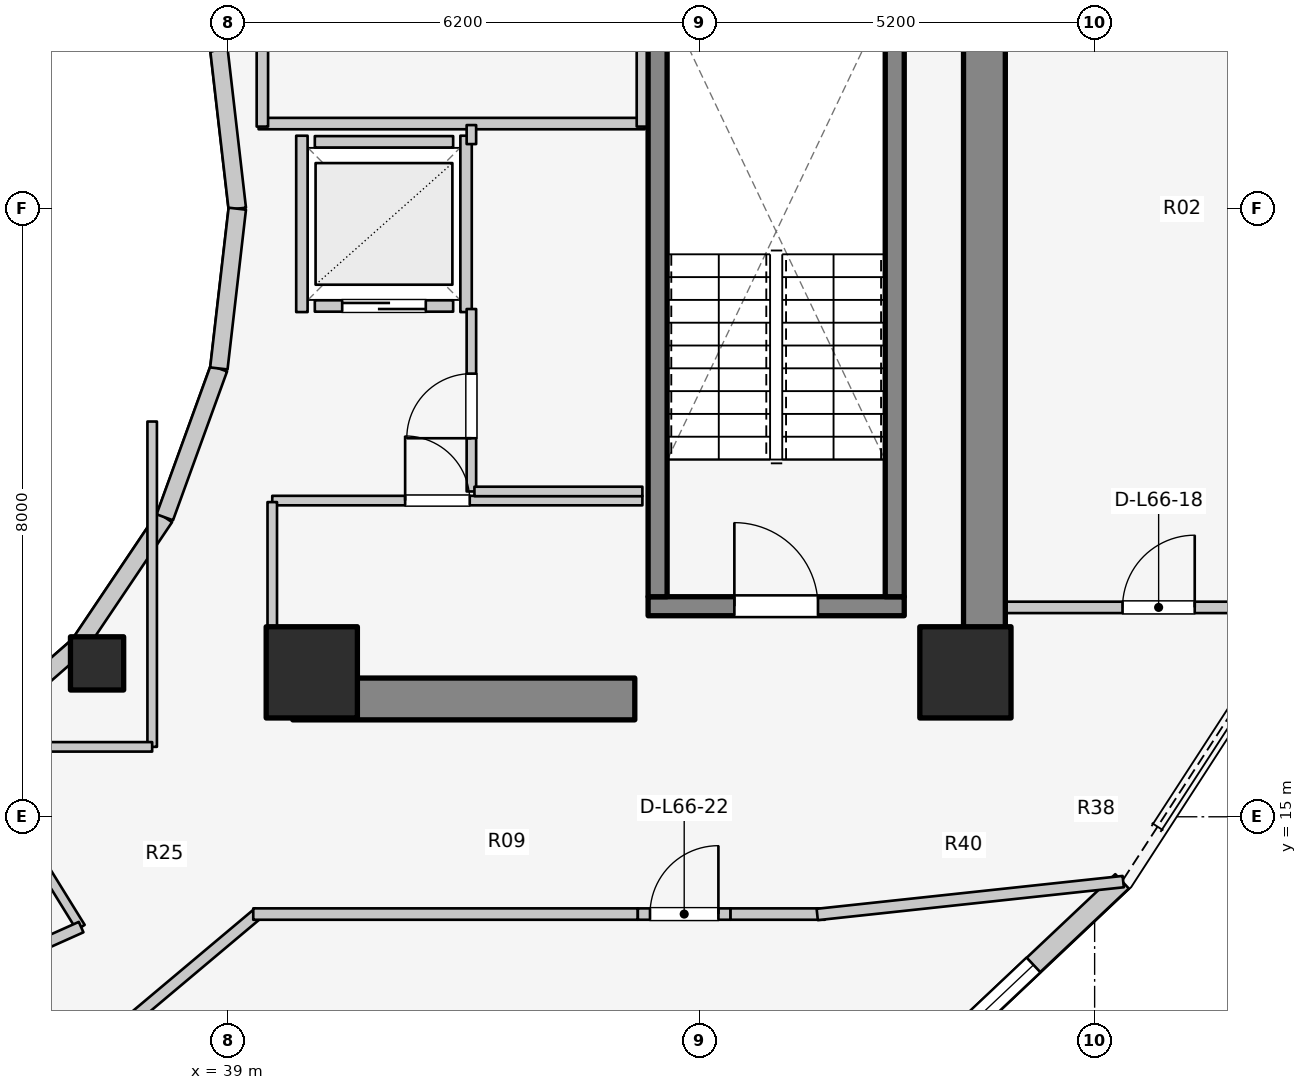
"""IFC4 building model, lengths in metres.
Left out: names, types, materials, properties, quantities, classifications, styles, units other than length and angle.
Written with IfcOpenShell. Run it as: python <this file> out.ifc"""

import sys

from ifc_helpers import new_model, si_unit, direction, frame, frame_2d, origin, origin_2d, place, context, subcontext, project, spatial, rectangle, extrude, element, fill, save


model = new_model("IFC4")
c1 = context("Model", 3, precision=1e-05, world=origin(), true_north=direction((0.0, 1.0)))
c2 = subcontext(c1, "Body", "Model", "MODEL_VIEW")
j1 = project(units=[si_unit("LENGTHUNIT", "METRE"), si_unit("PLANEANGLEUNIT", "RADIAN")], contexts=[c1])
p1 = place(None, origin())
s1 = spatial("IfcSite", under=j1, at=p1, CompositionType="ELEMENT")
p2 = place(p1, origin())
s2 = spatial("IfcBuilding", under=s1, at=p2, CompositionType="ELEMENT")
p3 = place(p2, frame((0.0, 0.0, 217.1)))
s3 = spatial("IfcBuildingStorey", under=s2, at=p3, CompositionType="ELEMENT", Elevation=217.1)
p4 = place(p3, frame((48.95, 17.05, 0.0), z_axis=(0.0, 0.0, 1.0), x_axis=(0.0, 1.0, 0.0)))
e1 = element("IfcWall", 1, at=p4, inside=s3, PredefinedType="SHEAR", context=c2, shape_type="SweptSolid", body=[
    extrude(rectangle(XDim=12.8, YDim=0.55, at=frame_2d((6.4, 0.0))), origin(), (0.0, 0.0, 1.0), 3.1),
])
p5 = place(p3, frame((39.85, 16.55, 0.0), z_axis=(0.0, 0.0, 1.0), x_axis=(1.0, 0.0, 0.0)))
e2 = element("IfcWall", 2, at=p5, inside=s3, PredefinedType="SHEAR", context=c2, shape_type="SweptSolid", body=[
    extrude(rectangle(XDim=4.5, YDim=0.55, at=frame_2d((2.25, 0.0))), origin(), (0.0, 0.0, 1.0), 3.1),
])
p6 = place(p3, frame((44.525, 17.77, 0.0), z_axis=(0.0, 0.0, 1.0), x_axis=(1.0, 0.0, 0.0)))
e3 = element("IfcWall", 3, at=p6, inside=s3, PredefinedType="SOLIDWALL", context=c2, shape_type="SweptSolid", body=[
    extrude(rectangle(XDim=3.37, YDim=0.25, at=frame_2d((1.685, 0.0))), origin(), (0.0, 0.0, 1.0), 3.1),
])
p7 = place(p6, frame((1.135, 0.0, 0.0)))
e4 = element("IfcOpeningElement", 4, at=p7, cuts=e3, PredefinedType="OPENING", context=c2, shape_type="SweptSolid", body=[
    extrude(rectangle(XDim=1.1, YDim=2.1, at=frame_2d((0.55, 1.05))), frame((0.0, 0.135, 0.0), z_axis=(0.0, -1.0, 0.0), x_axis=(1.0, 0.0, 0.0)), (0.0, 0.0, 1.0), 0.27),
])
for number, where, z_axis, x_axis in (
    (5, (44.65, 17.895, 0.0), (0.0, 0.0, 1.0), (0.0, 1.0, 0.0)),
    (6, (47.77, 17.895, 0.0), (0.0, 0.0, 1.0), (0.0, 1.0, 0.0)),
):
    element("IfcWall", number, at=place(p3, frame(where, z_axis=z_axis, x_axis=x_axis)), inside=s3, PredefinedType="SOLIDWALL", context=c2, shape_type="SweptSolid", body=[
        extrude(rectangle(XDim=7.81, YDim=0.25, at=frame_2d((3.905, 0.0))), origin(), (0.0, 0.0, 1.0), 3.1),
    ])
for number, where, z_axis, x_axis in (
    (7, (40.1, 16.9, 0.0), (0.0, 0.0, 1.0), (1.0, 0.0, 0.0)),
    (8, (48.7, 16.9, 0.0), (0.0, 0.0, 1.0), (1.0, 0.0, 0.0)),
):
    element("IfcColumn", number, at=place(p3, frame(where, z_axis=z_axis, x_axis=x_axis)), inside=s3, PredefinedType="COLUMN", context=c2, shape_type="SweptSolid", body=[
        extrude(rectangle(XDim=1.2, YDim=1.2, at=origin_2d()), origin(), (0.0, 0.0, 1.0), 3.1),
    ])
p8 = place(p3, frame((37.275, 17.018, 0.0), z_axis=(0.0, 0.0, 1.0), x_axis=(1.0, 0.0, 0.0)))
e9 = element("IfcColumn", 9, at=p8, inside=s3, PredefinedType="COLUMN", context=c2, shape_type="SweptSolid", body=[
    extrude(rectangle(XDim=0.7, YDim=0.7, at=origin_2d()), origin(), (0.0, 0.0, 1.0), 3.1),
])
p9 = place(p3, frame((39.12, 23.0, 0.0), z_axis=(0.0, 0.0, 1.0), x_axis=(-0.114711713601, 0.993398823617, 0.0)))
e10 = element("IfcWall", 10, at=p9, inside=s3, PredefinedType="STANDARD", context=c2, shape_type="SweptSolid", body=[
    extrude(rectangle(XDim=2.115, YDim=0.23, at=frame_2d((1.058, 0.0))), origin(), (0.0, 0.0, 1.0), 2.56),
])
p10 = place(p3, frame((35.56, 15.968, 0.0), z_axis=(0.0, 0.0, 1.0), x_axis=(0.752576694707, 0.658504607869, 0.0)))
e11 = element("IfcWall", 11, at=p10, inside=s3, PredefinedType="STANDARD", context=c2, shape_type="SweptSolid", body=[
    extrude(rectangle(XDim=1.959, YDim=0.23, at=frame_2d((0.98, 0.0))), origin(), (0.0, 0.0, 1.0), 1.22),
])
p11 = place(p3, frame((37.035, 17.258, 0.0), z_axis=(0.0, 0.0, 1.0), x_axis=(0.558197800898, 0.829707909492, 0.0)))
e12 = element("IfcWall", 12, at=p11, inside=s3, PredefinedType="STANDARD", context=c2, shape_type="SweptSolid", body=[
    extrude(rectangle(XDim=2.027, YDim=0.23, at=frame_2d((1.013, 0.0))), origin(), (0.0, 0.0, 1.0), 1.22),
])
p12 = place(p3, frame((38.166, 18.94, 0.0), z_axis=(0.0, 0.0, 1.0), x_axis=(0.341423187295, 0.93990968033, 0.0)))
e13 = element("IfcWall", 13, at=p12, inside=s3, PredefinedType="STANDARD", context=c2, shape_type="SweptSolid", body=[
    extrude(rectangle(XDim=2.084, YDim=0.23, at=frame_2d((1.042, 0.0))), origin(), (0.0, 0.0, 1.0), 2.56),
])
p13 = place(p3, frame((38.877, 20.898, 0.0), z_axis=(0.0, 0.0, 1.0), x_axis=(0.114711713601, 0.993398823617, 0.0)))
e14 = element("IfcWall", 14, at=p13, inside=s3, PredefinedType="STANDARD", context=c2, shape_type="SweptSolid", body=[
    extrude(rectangle(XDim=2.115, YDim=0.23, at=frame_2d((1.058, 0.0))), origin(), (0.0, 0.0, 1.0), 2.56),
])
p14 = place(p3, frame((47.558, 11.128, 0.0), z_axis=(0.0, 0.0, 1.0), x_axis=(0.72731899451, 0.686299555752, 0.0)))
e15 = element("IfcWall", 15, at=p14, inside=s3, PredefinedType="STANDARD", context=c2, shape_type="SweptSolid", body=[
    extrude(rectangle(XDim=4.404, YDim=0.26, at=frame_2d((2.202, 0.0))), origin(), (0.0, 0.0, 1.0), 1.22),
])
p15 = place(p14, frame((1.602, 0.0, 0.15)))
e16 = element("IfcOpeningElement", 16, at=p15, cuts=e15, PredefinedType="OPENING", context=c2, shape_type="SweptSolid", body=[
    extrude(rectangle(XDim=1.2, YDim=0.9, at=frame_2d((0.6, 0.45))), frame((0.0, 0.14, 0.0), z_axis=(0.0, -1.0, 0.0), x_axis=(1.0, 0.0, 0.0)), (0.0, 0.0, 1.0), 0.28),
])
p16 = place(p3, frame((40.14, 21.72, 0.0), z_axis=(0.0, 0.0, 1.0), x_axis=(1.0, 0.0, 0.0)))
e17 = element("IfcWall", 17, at=p16, inside=s3, PredefinedType="SOLIDWALL", context=c2, shape_type="SweptSolid", body=[
    extrude(rectangle(XDim=1.82, YDim=0.15, at=frame_2d((0.91, 0.0))), origin(), (0.0, 0.0, 1.0), 2.12),
])
p17 = place(p16, frame((0.36, 0.0, 0.0)))
e18 = element("IfcOpeningElement", 18, at=p17, cuts=e17, PredefinedType="OPENING", context=c2, shape_type="SweptSolid", body=[
    extrude(rectangle(XDim=1.1, YDim=2.1, at=frame_2d((0.55, 1.05))), frame((0.0, 0.085, 0.0), z_axis=(0.0, -1.0, 0.0), x_axis=(1.0, 0.0, 0.0)), (0.0, 0.0, 1.0), 0.17),
])
p18 = place(p3, frame((40.14, 23.88, 0.0), z_axis=(0.0, 0.0, 1.0), x_axis=(1.0, 0.0, 0.0)))
e19 = element("IfcWall", 19, at=p18, inside=s3, PredefinedType="SOLIDWALL", context=c2, shape_type="SweptSolid", body=[
    extrude(rectangle(XDim=1.82, YDim=0.15, at=frame_2d((0.91, 0.0))), origin(), (0.0, 0.0, 1.0), 2.12),
])
p19 = place(p3, frame((39.97, 21.64, 0.0), z_axis=(0.0, 0.0, 1.0), x_axis=(0.0, 1.0, 0.0)))
e20 = element("IfcWall", 20, at=p19, inside=s3, PredefinedType="SOLIDWALL", context=c2, shape_type="SweptSolid", body=[
    extrude(rectangle(XDim=2.32, YDim=0.15, at=frame_2d((1.16, 0.0))), origin(), (0.0, 0.0, 1.0), 2.12),
])
p20 = place(p3, frame((42.13, 21.64, 0.0), z_axis=(0.0, 0.0, 1.0), x_axis=(0.0, 1.0, 0.0)))
e21 = element("IfcWall", 21, at=p20, inside=s3, PredefinedType="SOLIDWALL", context=c2, shape_type="SweptSolid", body=[
    extrude(rectangle(XDim=2.32, YDim=0.15, at=frame_2d((1.16, 0.0))), origin(), (0.0, 0.0, 1.0), 2.575),
])
p21 = place(p3, frame((39.4, 24.12, 0.0), z_axis=(0.0, 0.0, 1.0), x_axis=(1.0, 0.0, 0.0)))
e22 = element("IfcWall", 22, at=p21, inside=s3, PredefinedType="PARTITIONING", context=c2, shape_type="SweptSolid", body=[
    extrude(rectangle(XDim=5.08, YDim=0.15, at=frame_2d((2.54, 0.0))), origin(), (0.0, 0.0, 1.0), 2.12),
])
p22 = place(p3, frame((44.45, 24.08, 0.0), z_axis=(0.0, 0.0, 1.0), x_axis=(0.0, 1.0, 0.0)))
e23 = element("IfcWall", 23, at=p22, inside=s3, PredefinedType="PARTITIONING", context=c2, shape_type="SweptSolid", body=[
    extrude(rectangle(XDim=3.2, YDim=0.15, at=frame_2d((1.6, 0.0))), origin(), (0.0, 0.0, 1.0), 2.575),
])
p23 = place(p3, frame((39.45, 24.08, 0.0), z_axis=(0.0, 0.0, 1.0), x_axis=(0.0, 1.0, 0.0)))
e24 = element("IfcWall", 24, at=p23, inside=s3, PredefinedType="PARTITIONING", context=c2, shape_type="SweptSolid", body=[
    extrude(rectangle(XDim=3.4, YDim=0.15, at=frame_2d((1.7, 0.0))), origin(), (0.0, 0.0, 1.0), 2.575),
])
p24 = place(p23, frame((1.894, 0.0, 0.0)))
e25 = element("IfcOpeningElement", 25, at=p24, cuts=e24, PredefinedType="OPENING", context=c2, shape_type="SweptSolid", body=[
    extrude(rectangle(XDim=1.1, YDim=2.1, at=frame_2d((0.55, 1.05))), frame((0.0, 0.085, 0.0), z_axis=(0.0, -1.0, 0.0), x_axis=(1.0, 0.0, 0.0)), (0.0, 0.0, 1.0), 0.17),
])
p25 = place(p3, frame((39.58, 19.16, 0.0), z_axis=(0.0, 0.0, 1.0), x_axis=(1.0, 0.0, 0.0)))
e26 = element("IfcWall", 26, at=p25, inside=s3, PredefinedType="PARTITIONING", context=c2, shape_type="SweptSolid", body=[
    extrude(rectangle(XDim=4.87, YDim=0.125, at=frame_2d((2.435, 0.0))), origin(), (0.0, 0.0, 1.0), 2.12),
])
p26 = place(p25, frame((1.748, 0.0, 0.0)))
e27 = element("IfcOpeningElement", 27, at=p26, cuts=e26, PredefinedType="OPENING", context=c2, shape_type="SweptSolid", body=[
    extrude(rectangle(XDim=0.85, YDim=2.05, at=frame_2d((0.425, 1.025))), frame((0.0, 0.073, 0.0), z_axis=(0.0, -1.0, 0.0), x_axis=(1.0, 0.0, 0.0)), (0.0, 0.0, 1.0), 0.145),
])
p27 = place(p3, frame((39.58, 17.1, 0.0), z_axis=(0.0, 0.0, 1.0), x_axis=(0.0, 1.0, 0.0)))
e28 = element("IfcWall", 28, at=p27, inside=s3, PredefinedType="PARTITIONING", context=c2, shape_type="SweptSolid", body=[
    extrude(rectangle(XDim=2.04, YDim=0.125, at=frame_2d((1.02, 0.0))), origin(), (0.0, 0.0, 1.0), 1.952),
])
p28 = place(p3, frame((42.2, 19.28, 0.0), z_axis=(0.0, 0.0, 1.0), x_axis=(0.0, 1.0, 0.0)))
e29 = element("IfcWall", 29, at=p28, inside=s3, PredefinedType="PARTITIONING", context=c2, shape_type="SweptSolid", body=[
    extrude(rectangle(XDim=2.4, YDim=0.125, at=frame_2d((1.2, 0.0))), origin(), (0.0, 0.0, 1.0), 2.575),
])
p29 = place(p28, frame((0.7, 0.0, 0.0)))
e30 = element("IfcOpeningElement", 30, at=p29, cuts=e29, PredefinedType="OPENING", context=c2, shape_type="SweptSolid", body=[
    extrude(rectangle(XDim=0.85, YDim=2.05, at=frame_2d((0.425, 1.025))), frame((0.0, 0.073, 0.0), z_axis=(0.0, -1.0, 0.0), x_axis=(1.0, 0.0, 0.0)), (0.0, 0.0, 1.0), 0.145),
])
p30 = place(p3, frame((42.2, 23.85, 0.0), z_axis=(0.0, 0.0, 1.0), x_axis=(0.0, 1.0, 0.0)))
e31 = element("IfcWall", 31, at=p30, inside=s3, PredefinedType="PARTITIONING", context=c2, shape_type="SweptSolid", body=[
    extrude(rectangle(XDim=0.25, YDim=0.125, at=frame_2d((0.125, 0.0))), origin(), (0.0, 0.0, 1.0), 2.575),
])
p31 = place(p3, frame((42.24, 19.28, 0.0), z_axis=(0.0, 0.0, 1.0), x_axis=(1.0, 0.0, 0.0)))
e32 = element("IfcWall", 32, at=p31, inside=s3, PredefinedType="PARTITIONING", context=c2, shape_type="SweptSolid", body=[
    extrude(rectangle(XDim=2.21, YDim=0.125, at=frame_2d((1.105, 0.0))), origin(), (0.0, 0.0, 1.0), 2.12),
])
p32 = place(p3, frame((35.55, 15.985, 0.0), z_axis=(0.0, 0.0, 1.0), x_axis=(0.52592395012, -0.850531597702, 0.0)))
e33 = element("IfcWall", 33, at=p32, inside=s3, PredefinedType="PARTITIONING", context=c2, shape_type="SweptSolid", body=[
    extrude(rectangle(XDim=2.869, YDim=0.125, at=frame_2d((1.435, 0.0))), origin(), (0.0, 0.0, 1.0), 1.22),
])
p33 = place(p3, frame((36.63, 13.354, 0.0), z_axis=(0.0, 0.0, 1.0), x_axis=(0.9128584484, 0.40827619718, 0.0)))
e34 = element("IfcWall", 34, at=p33, inside=s3, PredefinedType="PARTITIONING", context=c2, shape_type="SweptSolid", body=[
    extrude(rectangle(XDim=0.477, YDim=0.15, at=frame_2d((0.238, 0.0))), origin(), (0.0, 0.0, 1.0), 2.575),
])
p34 = place(p3, frame((38.0, 15.92, 0.0), z_axis=(0.0, 0.0, 1.0), x_axis=(0.0, 1.0, 0.0)))
e35 = element("IfcWall", 35, at=p34, inside=s3, PredefinedType="PARTITIONING", context=c2, shape_type="SweptSolid", body=[
    extrude(rectangle(XDim=4.28, YDim=0.125, at=frame_2d((2.14, 0.0))), origin(), (0.0, 0.0, 1.0), 1.22),
])
p35 = place(p3, frame((35.4, 15.92, 0.0), z_axis=(0.0, 0.0, 1.0), x_axis=(1.0, 0.0, 0.0)))
e36 = element("IfcWall", 36, at=p35, inside=s3, PredefinedType="PARTITIONING", context=c2, shape_type="SweptSolid", body=[
    extrude(rectangle(XDim=2.6, YDim=0.125, at=frame_2d((1.3, 0.0))), origin(), (0.0, 0.0, 1.0), 1.22),
])
p36 = place(p3, frame((48.95, 17.755, 0.0), z_axis=(0.0, 0.0, 1.0), x_axis=(1.0, 0.0, 0.0)))
e37 = element("IfcWall", 37, at=p36, inside=s3, PredefinedType="PARTITIONING", context=c2, shape_type="SweptSolid", body=[
    extrude(rectangle(XDim=4.175, YDim=0.15, at=frame_2d((2.087, 0.0))), origin(), (0.0, 0.0, 1.0), 2.575),
])
p37 = place(p36, frame((1.817, 0.0, 0.0)))
e38 = element("IfcOpeningElement", 38, at=p37, cuts=e37, PredefinedType="OPENING", context=c2, shape_type="SweptSolid", body=[
    extrude(rectangle(XDim=0.95, YDim=2.1, at=frame_2d((0.475, 1.05))), frame((0.0, 0.085, 0.0), z_axis=(0.0, -1.0, 0.0), x_axis=(1.0, 0.0, 0.0)), (0.0, 0.0, 1.0), 0.17),
])
p38 = place(p3, frame((37.791, 12.385, 0.0), z_axis=(0.0, 0.0, 1.0), x_axis=(0.765677451641, 0.643224719711, 0.0)))
e39 = element("IfcWall", 39, at=p38, inside=s3, PredefinedType="PARTITIONING", context=c2, shape_type="SweptSolid", body=[
    extrude(rectangle(XDim=2.105, YDim=0.15, at=frame_2d((1.053, 0.0))), origin(), (0.0, 0.0, 1.0), 1.22),
])
p39 = place(p3, frame((39.33, 13.72, 0.0), z_axis=(0.0, 0.0, 1.0), x_axis=(1.0, 0.0, 0.0)))
e40 = element("IfcWall", 40, at=p39, inside=s3, PredefinedType="PARTITIONING", context=c2, shape_type="SweptSolid", body=[
    extrude(rectangle(XDim=5.06, YDim=0.15, at=frame_2d((2.53, 0.0))), origin(), (0.0, 0.0, 1.0), 1.22),
])
p40 = place(p3, frame((44.39, 13.72, 0.0), z_axis=(0.0, 0.0, 1.0), x_axis=(1.0, 0.0, 0.0)))
e41 = element("IfcWall", 41, at=p40, inside=s3, PredefinedType="PARTITIONING", context=c2, shape_type="SweptSolid", body=[
    extrude(rectangle(XDim=1.22, YDim=0.15, at=frame_2d((0.61, 0.0))), origin(), (0.0, 0.0, 1.0), 2.575),
])
p41 = place(p40, frame((0.16, 0.0, 0.0)))
e42 = element("IfcOpeningElement", 42, at=p41, cuts=e41, PredefinedType="OPENING", context=c2, shape_type="SweptSolid", body=[
    extrude(rectangle(XDim=0.9, YDim=2.1, at=frame_2d((0.45, 1.05))), frame((0.0, 0.085, 0.0), z_axis=(0.0, -1.0, 0.0), x_axis=(1.0, 0.0, 0.0)), (0.0, 0.0, 1.0), 0.17),
])
p42 = place(p3, frame((45.61, 13.72, 0.0), z_axis=(0.0, 0.0, 1.0), x_axis=(1.0, 0.0, 0.0)))
e43 = element("IfcWall", 43, at=p42, inside=s3, PredefinedType="PARTITIONING", context=c2, shape_type="SweptSolid", body=[
    extrude(rectangle(XDim=1.24, YDim=0.15, at=frame_2d((0.62, 0.0))), origin(), (0.0, 0.0, 1.0), 2.575),
])
p43 = place(p3, frame((46.75, 13.715, 0.0), z_axis=(0.0, 0.0, 1.0), x_axis=(0.994275802046, 0.106843949134, 0.0)))
e44 = element("IfcWall", 44, at=p43, inside=s3, PredefinedType="PARTITIONING", context=c2, shape_type="SweptSolid", body=[
    extrude(rectangle(XDim=4.049, YDim=0.15, at=frame_2d((2.024, 0.0))), origin(), (0.0, 0.0, 1.0), 1.22),
])
p44 = place(p15, origin())
e45 = element("IfcWindow", 45, at=p44, inside=s3, PartitioningType="SINGLE_PANEL", PredefinedType="WINDOW", context=c2, shape_type="SweptSolid", body=[
    extrude(rectangle(XDim=1.2, YDim=0.9, at=frame_2d((0.6, 0.45))), frame((0.0, 0.03, 0.0), z_axis=(0.0, -1.0, 0.0), x_axis=(1.0, 0.0, 0.0)), (0.0, 0.0, 1.0), 0.06),
])
fill(e16, e45)
p45 = place(p7, origin())
e46 = element("IfcDoor", 46, at=p45, inside=s3, OperationType="SINGLE_SWING_LEFT", PredefinedType="DOOR", context=c2, shape_type="SweptSolid", body=[
    extrude(rectangle(XDim=1.1, YDim=2.1, at=frame_2d((0.55, 1.05))), frame((0.0, 0.025, 0.0), z_axis=(0.0, -1.0, 0.0), x_axis=(1.0, 0.0, 0.0)), (0.0, 0.0, 1.0), 0.05),
])
fill(e4, e46)
p46 = place(p17, origin())
e47 = element("IfcDoor", 47, at=p46, inside=s3, OperationType="DOUBLE_DOOR_SLIDING", PredefinedType="DOOR", context=c2, shape_type="SweptSolid", body=[
    extrude(rectangle(XDim=1.1, YDim=2.1, at=frame_2d((0.55, 1.05))), frame((0.0, 0.025, 0.0), z_axis=(0.0, -1.0, 0.0), x_axis=(1.0, 0.0, 0.0)), (0.0, 0.0, 1.0), 0.05),
])
fill(e18, e47)
p47 = place(p26, origin())
e48 = element("IfcDoor", 48, at=p47, inside=s3, OperationType="SINGLE_SWING_LEFT", PredefinedType="DOOR", context=c2, shape_type="SweptSolid", body=[
    extrude(rectangle(XDim=0.85, YDim=2.05, at=frame_2d((0.425, 1.025))), frame((0.0, 0.025, 0.0), z_axis=(0.0, -1.0, 0.0), x_axis=(1.0, 0.0, 0.0)), (0.0, 0.0, 1.0), 0.05),
])
fill(e27, e48)
p48 = place(p29, origin())
e49 = element("IfcDoor", 49, at=p48, inside=s3, OperationType="SINGLE_SWING_LEFT", PredefinedType="DOOR", context=c2, shape_type="SweptSolid", body=[
    extrude(rectangle(XDim=0.85, YDim=2.05, at=frame_2d((0.425, 1.025))), frame((0.0, 0.025, 0.0), z_axis=(0.0, -1.0, 0.0), x_axis=(1.0, 0.0, 0.0)), (0.0, 0.0, 1.0), 0.05),
])
fill(e30, e49)
p49 = place(p37, origin())
e50 = element("IfcDoor", 50, at=p49, inside=s3, OperationType="SINGLE_SWING_RIGHT", PredefinedType="DOOR", context=c2, shape_type="SweptSolid", body=[
    extrude(rectangle(XDim=0.95, YDim=2.1, at=frame_2d((0.475, 1.05))), frame((0.0, 0.025, 0.0), z_axis=(0.0, -1.0, 0.0), x_axis=(1.0, 0.0, 0.0)), (0.0, 0.0, 1.0), 0.05),
])
fill(e38, e50)
p50 = place(p41, origin())
e51 = element("IfcDoor", 51, at=p50, inside=s3, OperationType="SINGLE_SWING_RIGHT", PredefinedType="DOOR", context=c2, shape_type="SweptSolid", body=[
    extrude(rectangle(XDim=0.9, YDim=2.1, at=frame_2d((0.45, 1.05))), frame((0.0, 0.025, 0.0), z_axis=(0.0, -1.0, 0.0), x_axis=(1.0, 0.0, 0.0)), (0.0, 0.0, 1.0), 0.05),
])
fill(e42, e51)
save(model, sys.argv[1])
